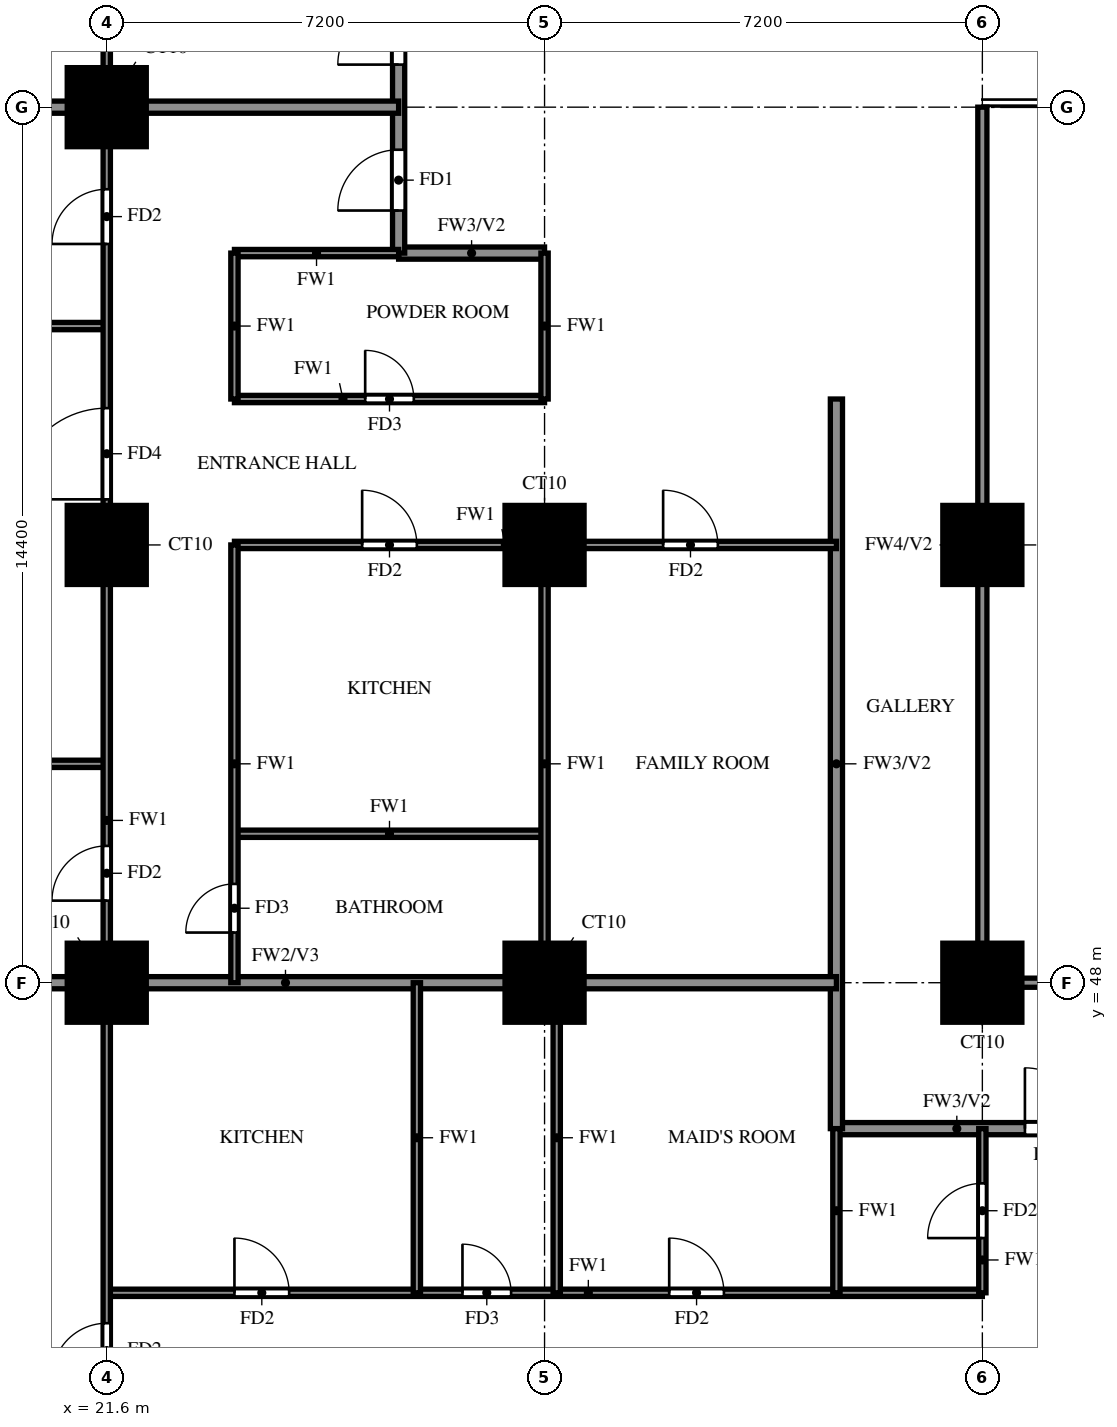
"""IFC4 building model, lengths in metres.
Left out: names, types, materials, properties, quantities, classifications, styles, units other than length and angle.
Written with IfcOpenShell. Run it as: python <this file> out.ifc"""

import sys

from ifc_helpers import new_model, si_unit, direction, frame, frame_2d, origin, origin_2d, place, context, subcontext, project, spatial, rectangle, extrude, source, transform, mapped, element, fill, save


model = new_model("IFC4")
c1 = context("Model", 3, precision=1e-05, world=origin(), true_north=direction((0.0, 1.0)))
c2 = subcontext(c1, "Body", "Model", "MODEL_VIEW")
j1 = project(units=[si_unit("LENGTHUNIT", "METRE"), si_unit("PLANEANGLEUNIT", "RADIAN")], contexts=[c1])
p1 = place(None, origin())
s1 = spatial("IfcSite", under=j1, at=p1, CompositionType="ELEMENT")
p2 = place(p1, origin())
s2 = spatial("IfcBuilding", under=s1, at=p2, CompositionType="ELEMENT")
p3 = place(p2, frame((0.0, 0.0, 83.0)))
s3 = spatial("IfcBuildingStorey", under=s2, at=p3, CompositionType="ELEMENT", Elevation=83.0)
m1 = source(origin(), c2, "Body", "SweptSolid", [
    extrude(rectangle(XDim=1.3, YDim=1.3, at=origin_2d()), origin(), (0.0, 0.0, 1.0), 3.18),
])
for number, where, z_axis, x_axis in (
    (1, (21.6, 48.0, 0.0), (0.0, 0.0, 1.0), (1.0, 0.0, 0.0)),
    (2, (28.8, 48.0, 0.0), (0.0, 0.0, 1.0), (1.0, 0.0, 0.0)),
    (3, (36.0, 48.0, 0.0), (0.0, 0.0, 1.0), (1.0, 0.0, 0.0)),
    (4, (21.6, 55.2, 0.0), (0.0, 0.0, 1.0), (1.0, 0.0, 0.0)),
    (5, (28.8, 55.2, 0.0), (0.0, 0.0, 1.0), (1.0, 0.0, 0.0)),
    (6, (36.0, 55.2, 0.0), (0.0, 0.0, 1.0), (1.0, 0.0, 0.0)),
    (7, (21.6, 62.4, 0.0), (0.0, 0.0, 1.0), (1.0, 0.0, 0.0)),
):
    element("IfcColumn", number, at=place(p3, frame(where, z_axis=z_axis, x_axis=x_axis)), inside=s3, PredefinedType="COLUMN", context=c2, shape_type="MappedRepresentation", body=[
        mapped(m1, transform((0.0, 0.0, 0.0))),
    ])
p4 = place(p3, frame((33.6, 45.6, 0.0), z_axis=(0.0, 0.0, 1.0), x_axis=(1.0, 0.0, 0.0)))
e8 = element("IfcWall", 8, at=p4, inside=s3, PredefinedType="SOLIDWALL", context=c2, shape_type="SweptSolid", body=[
    extrude(rectangle(XDim=7.2, YDim=0.2, at=frame_2d((3.6, 0.0))), origin(), (0.0, 0.0, 1.0), 3.18),
])
p5 = place(p4, frame((3.1, 0.0, 0.0)))
e9 = element("IfcOpeningElement", 9, at=p5, cuts=e8, PredefinedType="OPENING", context=c2, shape_type="SweptSolid", body=[
    extrude(rectangle(XDim=1.0, YDim=2.1, at=frame_2d((0.5, 1.05))), frame((0.0, 0.11, 0.0), z_axis=(0.0, -1.0, 0.0), x_axis=(1.0, 0.0, 0.0)), (0.0, 0.0, 1.0), 0.22),
])
p6 = place(p3, frame((26.4, 60.0, 0.0), z_axis=(0.0, 0.0, 1.0), x_axis=(1.0, 0.0, 0.0)))
e10 = element("IfcWall", 10, at=p6, inside=s3, PredefinedType="SOLIDWALL", context=c2, shape_type="SweptSolid", body=[
    extrude(rectangle(XDim=2.4, YDim=0.2, at=frame_2d((1.2, 0.0))), origin(), (0.0, 0.0, 1.0), 3.18),
])
p7 = place(p3, frame((26.4, 60.0, 0.0), z_axis=(0.0, 0.0, 1.0), x_axis=(0.0, 1.0, 0.0)))
e11 = element("IfcWall", 11, at=p7, inside=s3, PredefinedType="SOLIDWALL", context=c2, shape_type="SweptSolid", body=[
    extrude(rectangle(XDim=9.45, YDim=0.2, at=frame_2d((4.725, 0.0))), origin(), (0.0, 0.0, 1.0), 3.18),
])
p8 = place(p7, frame((0.7, 0.0, 0.0)))
e12 = element("IfcOpeningElement", 12, at=p8, cuts=e11, PredefinedType="OPENING", context=c2, shape_type="SweptSolid", body=[
    extrude(rectangle(XDim=1.0, YDim=2.1, at=frame_2d((0.5, 1.05))), frame((0.0, 0.11, 0.0), z_axis=(0.0, -1.0, 0.0), x_axis=(1.0, 0.0, 0.0)), (0.0, 0.0, 1.0), 0.22),
])
p9 = place(p7, frame((3.1, 0.0, 0.0)))
e13 = element("IfcOpeningElement", 13, at=p9, cuts=e11, PredefinedType="OPENING", context=c2, shape_type="SweptSolid", body=[
    extrude(rectangle(XDim=1.0, YDim=2.1, at=frame_2d((0.5, 1.05))), frame((0.0, 0.11, 0.0), z_axis=(0.0, -1.0, 0.0), x_axis=(1.0, 0.0, 0.0)), (0.0, 0.0, 1.0), 0.22),
])
p10 = place(p3, frame((33.6, 45.6, 0.0), z_axis=(0.0, 0.0, 1.0), x_axis=(0.0, 1.0, 0.0)))
e14 = element("IfcWall", 14, at=p10, inside=s3, PredefinedType="SOLIDWALL", context=c2, shape_type="SweptSolid", body=[
    extrude(rectangle(XDim=12.0, YDim=0.2, at=frame_2d((6.0, 0.0))), origin(), (0.0, 0.0, 1.0), 3.18),
])
p11 = place(p3, frame((14.525, 48.0, 0.0), z_axis=(0.0, 0.0, 1.0), x_axis=(1.0, 0.0, 0.0)))
e15 = element("IfcWall", 15, at=p11, inside=s3, PredefinedType="SOLIDWALL", context=c2, shape_type="SweptSolid", body=[
    extrude(rectangle(XDim=19.075, YDim=0.2, at=frame_2d((9.538, 0.0))), origin(), (0.0, 0.0, 1.0), 3.18),
])
p12 = place(p3, frame((14.525, 62.4, 0.0), z_axis=(0.0, 0.0, 1.0), x_axis=(1.0, 0.0, 0.0)))
e16 = element("IfcWall", 16, at=p12, inside=s3, PredefinedType="SOLIDWALL", context=c2, shape_type="SweptSolid", body=[
    extrude(rectangle(XDim=11.875, YDim=0.2, at=frame_2d((5.938, 0.0))), origin(), (0.0, 0.0, 1.0), 3.18),
])
p13 = place(p3, frame((21.6, 42.9, 0.0), z_axis=(0.0, 0.0, 1.0), x_axis=(1.0, 0.0, 0.0)))
e17 = element("IfcWall", 17, at=p13, inside=s3, PredefinedType="PARTITIONING", context=c2, shape_type="SweptSolid", body=[
    extrude(rectangle(XDim=14.4, YDim=0.12, at=frame_2d((7.2, 0.0))), origin(), (0.0, 0.0, 1.0), 3.18),
])
p14 = place(p13, frame((2.1, 0.0, 0.0)))
e18 = element("IfcOpeningElement", 18, at=p14, cuts=e17, PredefinedType="OPENING", context=c2, shape_type="SweptSolid", body=[
    extrude(rectangle(XDim=0.9, YDim=2.1, at=frame_2d((0.45, 1.05))), frame((0.0, 0.07, 0.0), z_axis=(0.0, -1.0, 0.0), x_axis=(1.0, 0.0, 0.0)), (0.0, 0.0, 1.0), 0.14),
])
p15 = place(p13, frame((5.85, 0.0, 0.0)))
e19 = element("IfcOpeningElement", 19, at=p15, cuts=e17, PredefinedType="OPENING", context=c2, shape_type="SweptSolid", body=[
    extrude(rectangle(XDim=0.8, YDim=2.1, at=frame_2d((0.4, 1.05))), frame((0.0, 0.07, 0.0), z_axis=(0.0, -1.0, 0.0), x_axis=(1.0, 0.0, 0.0)), (0.0, 0.0, 1.0), 0.14),
])
p16 = place(p13, frame((9.25, 0.0, 0.0)))
e20 = element("IfcOpeningElement", 20, at=p16, cuts=e17, PredefinedType="OPENING", context=c2, shape_type="SweptSolid", body=[
    extrude(rectangle(XDim=0.9, YDim=2.1, at=frame_2d((0.45, 1.05))), frame((0.0, 0.07, 0.0), z_axis=(0.0, -1.0, 0.0), x_axis=(1.0, 0.0, 0.0)), (0.0, 0.0, 1.0), 0.14),
])
p17 = place(p3, frame((23.7, 50.45, 0.0), z_axis=(0.0, 0.0, 1.0), x_axis=(1.0, 0.0, 0.0)))
e21 = element("IfcWall", 21, at=p17, inside=s3, PredefinedType="PARTITIONING", context=c2, shape_type="SweptSolid", body=[
    extrude(rectangle(XDim=5.1, YDim=0.12, at=frame_2d((2.55, 0.0))), origin(), (0.0, 0.0, 1.0), 3.18),
])
p18 = place(p3, frame((14.525, 51.6, 0.0), z_axis=(0.0, 0.0, 1.0), x_axis=(1.0, 0.0, 0.0)))
e22 = element("IfcWall", 22, at=p18, inside=s3, PredefinedType="PARTITIONING", context=c2, shape_type="SweptSolid", body=[
    extrude(rectangle(XDim=7.075, YDim=0.12, at=frame_2d((3.538, 0.0))), origin(), (0.0, 0.0, 1.0), 2.28),
])
p19 = place(p3, frame((23.7, 55.2, 0.0), z_axis=(0.0, 0.0, 1.0), x_axis=(1.0, 0.0, 0.0)))
e23 = element("IfcWall", 23, at=p19, inside=s3, PredefinedType="PARTITIONING", context=c2, shape_type="SweptSolid", body=[
    extrude(rectangle(XDim=9.9, YDim=0.12, at=frame_2d((4.95, 0.0))), origin(), (0.0, 0.0, 1.0), 3.18),
])
p20 = place(p19, frame((2.1, 0.0, 0.0)))
e24 = element("IfcOpeningElement", 24, at=p20, cuts=e23, PredefinedType="OPENING", context=c2, shape_type="SweptSolid", body=[
    extrude(rectangle(XDim=0.9, YDim=2.1, at=frame_2d((0.45, 1.05))), frame((0.0, 0.07, 0.0), z_axis=(0.0, -1.0, 0.0), x_axis=(1.0, 0.0, 0.0)), (0.0, 0.0, 1.0), 0.14),
])
p21 = place(p19, frame((7.05, 0.0, 0.0)))
e25 = element("IfcOpeningElement", 25, at=p21, cuts=e23, PredefinedType="OPENING", context=c2, shape_type="SweptSolid", body=[
    extrude(rectangle(XDim=0.9, YDim=2.1, at=frame_2d((0.45, 1.05))), frame((0.0, 0.07, 0.0), z_axis=(0.0, -1.0, 0.0), x_axis=(1.0, 0.0, 0.0)), (0.0, 0.0, 1.0), 0.14),
])
p22 = place(p3, frame((23.7, 57.6, 0.0), z_axis=(0.0, 0.0, 1.0), x_axis=(1.0, 0.0, 0.0)))
e26 = element("IfcWall", 26, at=p22, inside=s3, PredefinedType="PARTITIONING", context=c2, shape_type="SweptSolid", body=[
    extrude(rectangle(XDim=5.1, YDim=0.12, at=frame_2d((2.55, 0.0))), origin(), (0.0, 0.0, 1.0), 3.18),
])
p23 = place(p22, frame((2.15, 0.0, 0.0)))
e27 = element("IfcOpeningElement", 27, at=p23, cuts=e26, PredefinedType="OPENING", context=c2, shape_type="SweptSolid", body=[
    extrude(rectangle(XDim=0.8, YDim=2.1, at=frame_2d((0.4, 1.05))), frame((0.0, 0.07, 0.0), z_axis=(0.0, -1.0, 0.0), x_axis=(1.0, 0.0, 0.0)), (0.0, 0.0, 1.0), 0.14),
])
p24 = place(p3, frame((14.525, 58.8, 0.0), z_axis=(0.0, 0.0, 1.0), x_axis=(1.0, 0.0, 0.0)))
e28 = element("IfcWall", 28, at=p24, inside=s3, PredefinedType="PARTITIONING", context=c2, shape_type="SweptSolid", body=[
    extrude(rectangle(XDim=7.075, YDim=0.12, at=frame_2d((3.538, 0.0))), origin(), (0.0, 0.0, 1.0), 2.28),
])
p25 = place(p3, frame((23.7, 60.0, 0.0), z_axis=(0.0, 0.0, 1.0), x_axis=(1.0, 0.0, 0.0)))
e29 = element("IfcWall", 29, at=p25, inside=s3, PredefinedType="PARTITIONING", context=c2, shape_type="SweptSolid", body=[
    extrude(rectangle(XDim=2.7, YDim=0.12, at=frame_2d((1.35, 0.0))), origin(), (0.0, 0.0, 1.0), 3.18),
])
p26 = place(p3, frame((21.6, 33.725, 0.0), z_axis=(0.0, 0.0, 1.0), x_axis=(0.0, 1.0, 0.0)))
e30 = element("IfcWall", 30, at=p26, inside=s3, PredefinedType="PARTITIONING", context=c2, shape_type="SweptSolid", body=[
    extrude(rectangle(XDim=32.275, YDim=0.12, at=frame_2d((16.137, 0.0))), origin(), (0.0, 0.0, 1.0), 3.18),
])
p27 = place(p26, frame((7.775, 0.0, 0.0)))
e31 = element("IfcOpeningElement", 31, at=p27, cuts=e30, PredefinedType="OPENING", context=c2, shape_type="SweptSolid", body=[
    extrude(rectangle(XDim=0.9, YDim=2.1, at=frame_2d((0.45, 1.05))), frame((0.0, 0.07, 0.0), z_axis=(0.0, -1.0, 0.0), x_axis=(1.0, 0.0, 0.0)), (0.0, 0.0, 1.0), 0.14),
])
p28 = place(p26, frame((15.625, 0.0, 0.0)))
e32 = element("IfcOpeningElement", 32, at=p28, cuts=e30, PredefinedType="OPENING", context=c2, shape_type="SweptSolid", body=[
    extrude(rectangle(XDim=0.9, YDim=2.1, at=frame_2d((0.45, 1.05))), frame((0.0, 0.07, 0.0), z_axis=(0.0, -1.0, 0.0), x_axis=(1.0, 0.0, 0.0)), (0.0, 0.0, 1.0), 0.14),
])
p29 = place(p26, frame((22.225, 0.0, 0.0)))
e33 = element("IfcOpeningElement", 33, at=p29, cuts=e30, PredefinedType="OPENING", context=c2, shape_type="SweptSolid", body=[
    extrude(rectangle(XDim=1.5, YDim=2.1, at=frame_2d((0.75, 1.05))), frame((0.0, 0.07, 0.0), z_axis=(0.0, -1.0, 0.0), x_axis=(1.0, 0.0, 0.0)), (0.0, 0.0, 1.0), 0.14),
])
p30 = place(p26, frame((26.425, 0.0, 0.0)))
e34 = element("IfcOpeningElement", 34, at=p30, cuts=e30, PredefinedType="OPENING", context=c2, shape_type="SweptSolid", body=[
    extrude(rectangle(XDim=0.9, YDim=2.1, at=frame_2d((0.45, 1.05))), frame((0.0, 0.07, 0.0), z_axis=(0.0, -1.0, 0.0), x_axis=(1.0, 0.0, 0.0)), (0.0, 0.0, 1.0), 0.14),
])
p31 = place(p26, frame((30.025, 0.0, 0.0)))
e35 = element("IfcOpeningElement", 35, at=p31, cuts=e30, PredefinedType="OPENING", context=c2, shape_type="SweptSolid", body=[
    extrude(rectangle(XDim=0.9, YDim=2.1, at=frame_2d((0.45, 1.05))), frame((0.0, 0.07, 0.0), z_axis=(0.0, -1.0, 0.0), x_axis=(1.0, 0.0, 0.0)), (0.0, 0.0, 1.0), 0.14),
])
p32 = place(p3, frame((23.7, 48.0, 0.0), z_axis=(0.0, 0.0, 1.0), x_axis=(0.0, 1.0, 0.0)))
e36 = element("IfcWall", 36, at=p32, inside=s3, PredefinedType="PARTITIONING", context=c2, shape_type="SweptSolid", body=[
    extrude(rectangle(XDim=7.2, YDim=0.12, at=frame_2d((3.6, 0.0))), origin(), (0.0, 0.0, 1.0), 3.18),
])
p33 = place(p32, frame((0.825, 0.0, 0.0)))
e37 = element("IfcOpeningElement", 37, at=p33, cuts=e36, PredefinedType="OPENING", context=c2, shape_type="SweptSolid", body=[
    extrude(rectangle(XDim=0.8, YDim=2.1, at=frame_2d((0.4, 1.05))), frame((0.0, 0.07, 0.0), z_axis=(0.0, -1.0, 0.0), x_axis=(1.0, 0.0, 0.0)), (0.0, 0.0, 1.0), 0.14),
])
p34 = place(p3, frame((23.7, 57.6, 0.0), z_axis=(0.0, 0.0, 1.0), x_axis=(0.0, 1.0, 0.0)))
e38 = element("IfcWall", 38, at=p34, inside=s3, PredefinedType="PARTITIONING", context=c2, shape_type="SweptSolid", body=[
    extrude(rectangle(XDim=2.4, YDim=0.12, at=frame_2d((1.2, 0.0))), origin(), (0.0, 0.0, 1.0), 3.18),
])
p35 = place(p3, frame((26.7, 42.9, 0.0), z_axis=(0.0, 0.0, 1.0), x_axis=(0.0, 1.0, 0.0)))
e39 = element("IfcWall", 39, at=p35, inside=s3, PredefinedType="PARTITIONING", context=c2, shape_type="SweptSolid", body=[
    extrude(rectangle(XDim=5.1, YDim=0.12, at=frame_2d((2.55, 0.0))), origin(), (0.0, 0.0, 1.0), 3.18),
])
p36 = place(p3, frame((28.8, 48.0, 0.0), z_axis=(0.0, 0.0, 1.0), x_axis=(0.0, 1.0, 0.0)))
e40 = element("IfcWall", 40, at=p36, inside=s3, PredefinedType="PARTITIONING", context=c2, shape_type="SweptSolid", body=[
    extrude(rectangle(XDim=7.2, YDim=0.12, at=frame_2d((3.6, 0.0))), origin(), (0.0, 0.0, 1.0), 3.18),
])
p37 = place(p3, frame((28.8, 57.6, 0.0), z_axis=(0.0, 0.0, 1.0), x_axis=(0.0, 1.0, 0.0)))
e41 = element("IfcWall", 41, at=p37, inside=s3, PredefinedType="PARTITIONING", context=c2, shape_type="SweptSolid", body=[
    extrude(rectangle(XDim=2.4, YDim=0.12, at=frame_2d((1.2, 0.0))), origin(), (0.0, 0.0, 1.0), 3.18),
])
p38 = place(p3, frame((29.0, 42.9, 0.0), z_axis=(0.0, 0.0, 1.0), x_axis=(0.0, 1.0, 0.0)))
e42 = element("IfcWall", 42, at=p38, inside=s3, PredefinedType="PARTITIONING", context=c2, shape_type="SweptSolid", body=[
    extrude(rectangle(XDim=5.1, YDim=0.12, at=frame_2d((2.55, 0.0))), origin(), (0.0, 0.0, 1.0), 3.18),
])
p39 = place(p3, frame((33.6, 42.9, 0.0), z_axis=(0.0, 0.0, 1.0), x_axis=(0.0, 1.0, 0.0)))
e43 = element("IfcWall", 43, at=p39, inside=s3, PredefinedType="PARTITIONING", context=c2, shape_type="SweptSolid", body=[
    extrude(rectangle(XDim=2.7, YDim=0.12, at=frame_2d((1.35, 0.0))), origin(), (0.0, 0.0, 1.0), 3.18),
])
p40 = place(p3, frame((36.0, 42.9, 0.0), z_axis=(0.0, 0.0, 1.0), x_axis=(0.0, 1.0, 0.0)))
e44 = element("IfcWall", 44, at=p40, inside=s3, PredefinedType="PARTITIONING", context=c2, shape_type="SweptSolid", body=[
    extrude(rectangle(XDim=2.7, YDim=0.12, at=frame_2d((1.35, 0.0))), origin(), (0.0, 0.0, 1.0), 3.18),
])
p41 = place(p40, frame((0.9, 0.0, 0.0)))
e45 = element("IfcOpeningElement", 45, at=p41, cuts=e44, PredefinedType="OPENING", context=c2, shape_type="SweptSolid", body=[
    extrude(rectangle(XDim=0.9, YDim=2.1, at=frame_2d((0.45, 1.05))), frame((0.0, 0.07, 0.0), z_axis=(0.0, -1.0, 0.0), x_axis=(1.0, 0.0, 0.0)), (0.0, 0.0, 1.0), 0.14),
])
p42 = place(p3, frame((36.0, 48.0, 0.0), z_axis=(0.0, 0.0, 1.0), x_axis=(1.0, 0.0, 0.0)))
e46 = element("IfcWall", 46, at=p42, inside=s3, PredefinedType="SOLIDWALL", context=c2, shape_type="SweptSolid", body=[
    extrude(rectangle(XDim=7.2, YDim=0.15, at=frame_2d((3.6, 0.0))), origin(), (0.0, 0.0, 1.0), 2.28),
])
p43 = place(p3, frame((36.0, 48.0, 0.0), z_axis=(0.0, 0.0, 1.0), x_axis=(0.0, 1.0, 0.0)))
e47 = element("IfcWall", 47, at=p43, inside=s3, PredefinedType="SOLIDWALL", context=c2, shape_type="SweptSolid", body=[
    extrude(rectangle(XDim=14.4, YDim=0.15, at=frame_2d((7.2, 0.0))), origin(), (0.0, 0.0, 1.0), 2.28),
])
p44 = place(p5, origin())
e48 = element("IfcDoor", 48, at=p44, inside=s3, OperationType="SINGLE_SWING_RIGHT", PredefinedType="DOOR", context=c2, shape_type="SweptSolid", body=[
    extrude(rectangle(XDim=1.0, YDim=2.1, at=frame_2d((0.5, 1.05))), frame((0.0, 0.025, 0.0), z_axis=(0.0, -1.0, 0.0), x_axis=(1.0, 0.0, 0.0)), (0.0, 0.0, 1.0), 0.05),
])
fill(e9, e48)
p45 = place(p27, origin())
e49 = element("IfcDoor", 49, at=p45, inside=s3, OperationType="SINGLE_SWING_RIGHT", PredefinedType="DOOR", context=c2, shape_type="SweptSolid", body=[
    extrude(rectangle(XDim=0.9, YDim=2.1, at=frame_2d((0.45, 1.05))), frame((0.0, 0.025, 0.0), z_axis=(0.0, -1.0, 0.0), x_axis=(1.0, 0.0, 0.0)), (0.0, 0.0, 1.0), 0.05),
])
fill(e31, e49)
p46 = place(p14, origin())
e50 = element("IfcDoor", 50, at=p46, inside=s3, OperationType="SINGLE_SWING_LEFT", PredefinedType="DOOR", context=c2, shape_type="SweptSolid", body=[
    extrude(rectangle(XDim=0.9, YDim=2.1, at=frame_2d((0.45, 1.05))), frame((0.0, 0.025, 0.0), z_axis=(0.0, -1.0, 0.0), x_axis=(1.0, 0.0, 0.0)), (0.0, 0.0, 1.0), 0.05),
])
fill(e18, e50)
p47 = place(p15, origin())
e51 = element("IfcDoor", 51, at=p47, inside=s3, OperationType="SINGLE_SWING_LEFT", PredefinedType="DOOR", context=c2, shape_type="SweptSolid", body=[
    extrude(rectangle(XDim=0.8, YDim=2.1, at=frame_2d((0.4, 1.05))), frame((0.0, 0.025, 0.0), z_axis=(0.0, -1.0, 0.0), x_axis=(1.0, 0.0, 0.0)), (0.0, 0.0, 1.0), 0.05),
])
fill(e19, e51)
p48 = place(p16, origin())
e52 = element("IfcDoor", 52, at=p48, inside=s3, OperationType="SINGLE_SWING_RIGHT", PredefinedType="DOOR", context=c2, shape_type="SweptSolid", body=[
    extrude(rectangle(XDim=0.9, YDim=2.1, at=frame_2d((0.45, 1.05))), frame((0.0, 0.025, 0.0), z_axis=(0.0, -1.0, 0.0), x_axis=(1.0, 0.0, 0.0)), (0.0, 0.0, 1.0), 0.05),
])
fill(e20, e52)
p49 = place(p41, origin())
e53 = element("IfcDoor", 53, at=p49, inside=s3, OperationType="SINGLE_SWING_LEFT", PredefinedType="DOOR", context=c2, shape_type="SweptSolid", body=[
    extrude(rectangle(XDim=0.9, YDim=2.1, at=frame_2d((0.45, 1.05))), frame((0.0, 0.025, 0.0), z_axis=(0.0, -1.0, 0.0), x_axis=(1.0, 0.0, 0.0)), (0.0, 0.0, 1.0), 0.05),
])
fill(e45, e53)
p50 = place(p8, origin())
e54 = element("IfcDoor", 54, at=p50, inside=s3, OperationType="SINGLE_SWING_RIGHT", PredefinedType="DOOR", context=c2, shape_type="SweptSolid", body=[
    extrude(rectangle(XDim=1.0, YDim=2.1, at=frame_2d((0.5, 1.05))), frame((0.0, 0.025, 0.0), z_axis=(0.0, -1.0, 0.0), x_axis=(1.0, 0.0, 0.0)), (0.0, 0.0, 1.0), 0.05),
])
fill(e12, e54)
p51 = place(p28, origin())
e55 = element("IfcDoor", 55, at=p51, inside=s3, OperationType="SINGLE_SWING_LEFT", PredefinedType="DOOR", context=c2, shape_type="SweptSolid", body=[
    extrude(rectangle(XDim=0.9, YDim=2.1, at=frame_2d((0.45, 1.05))), frame((0.0, 0.025, 0.0), z_axis=(0.0, -1.0, 0.0), x_axis=(1.0, 0.0, 0.0)), (0.0, 0.0, 1.0), 0.05),
])
fill(e32, e55)
p52 = place(p29, origin())
e56 = element("IfcDoor", 56, at=p52, inside=s3, OperationType="SINGLE_SWING_RIGHT", PredefinedType="DOOR", context=c2, shape_type="SweptSolid", body=[
    extrude(rectangle(XDim=1.5, YDim=2.1, at=frame_2d((0.75, 1.05))), frame((0.0, 0.025, 0.0), z_axis=(0.0, -1.0, 0.0), x_axis=(1.0, 0.0, 0.0)), (0.0, 0.0, 1.0), 0.05),
])
fill(e33, e56)
p53 = place(p30, origin())
e57 = element("IfcDoor", 57, at=p53, inside=s3, OperationType="SINGLE_SWING_RIGHT", PredefinedType="DOOR", context=c2, shape_type="SweptSolid", body=[
    extrude(rectangle(XDim=0.9, YDim=2.1, at=frame_2d((0.45, 1.05))), frame((0.0, 0.025, 0.0), z_axis=(0.0, -1.0, 0.0), x_axis=(1.0, 0.0, 0.0)), (0.0, 0.0, 1.0), 0.05),
])
fill(e34, e57)
p54 = place(p33, origin())
e58 = element("IfcDoor", 58, at=p54, inside=s3, OperationType="SINGLE_SWING_LEFT", PredefinedType="DOOR", context=c2, shape_type="SweptSolid", body=[
    extrude(rectangle(XDim=0.8, YDim=2.1, at=frame_2d((0.4, 1.05))), frame((0.0, 0.025, 0.0), z_axis=(0.0, -1.0, 0.0), x_axis=(1.0, 0.0, 0.0)), (0.0, 0.0, 1.0), 0.05),
])
fill(e37, e58)
p55 = place(p20, origin())
e59 = element("IfcDoor", 59, at=p55, inside=s3, OperationType="SINGLE_SWING_LEFT", PredefinedType="DOOR", context=c2, shape_type="SweptSolid", body=[
    extrude(rectangle(XDim=0.9, YDim=2.1, at=frame_2d((0.45, 1.05))), frame((0.0, 0.025, 0.0), z_axis=(0.0, -1.0, 0.0), x_axis=(1.0, 0.0, 0.0)), (0.0, 0.0, 1.0), 0.05),
])
fill(e24, e59)
p56 = place(p23, origin())
e60 = element("IfcDoor", 60, at=p56, inside=s3, OperationType="SINGLE_SWING_RIGHT", PredefinedType="DOOR", context=c2, shape_type="SweptSolid", body=[
    extrude(rectangle(XDim=0.8, YDim=2.1, at=frame_2d((0.4, 1.05))), frame((0.0, 0.025, 0.0), z_axis=(0.0, -1.0, 0.0), x_axis=(1.0, 0.0, 0.0)), (0.0, 0.0, 1.0), 0.05),
])
fill(e27, e60)
p57 = place(p21, origin())
e61 = element("IfcDoor", 61, at=p57, inside=s3, OperationType="SINGLE_SWING_LEFT", PredefinedType="DOOR", context=c2, shape_type="SweptSolid", body=[
    extrude(rectangle(XDim=0.9, YDim=2.1, at=frame_2d((0.45, 1.05))), frame((0.0, 0.025, 0.0), z_axis=(0.0, -1.0, 0.0), x_axis=(1.0, 0.0, 0.0)), (0.0, 0.0, 1.0), 0.05),
])
fill(e25, e61)
p58 = place(p9, origin())
e62 = element("IfcDoor", 62, at=p58, inside=s3, OperationType="SINGLE_SWING_LEFT", PredefinedType="DOOR", context=c2, shape_type="SweptSolid", body=[
    extrude(rectangle(XDim=1.0, YDim=2.1, at=frame_2d((0.5, 1.05))), frame((0.0, 0.025, 0.0), z_axis=(0.0, -1.0, 0.0), x_axis=(1.0, 0.0, 0.0)), (0.0, 0.0, 1.0), 0.05),
])
fill(e13, e62)
save(model, sys.argv[1])
